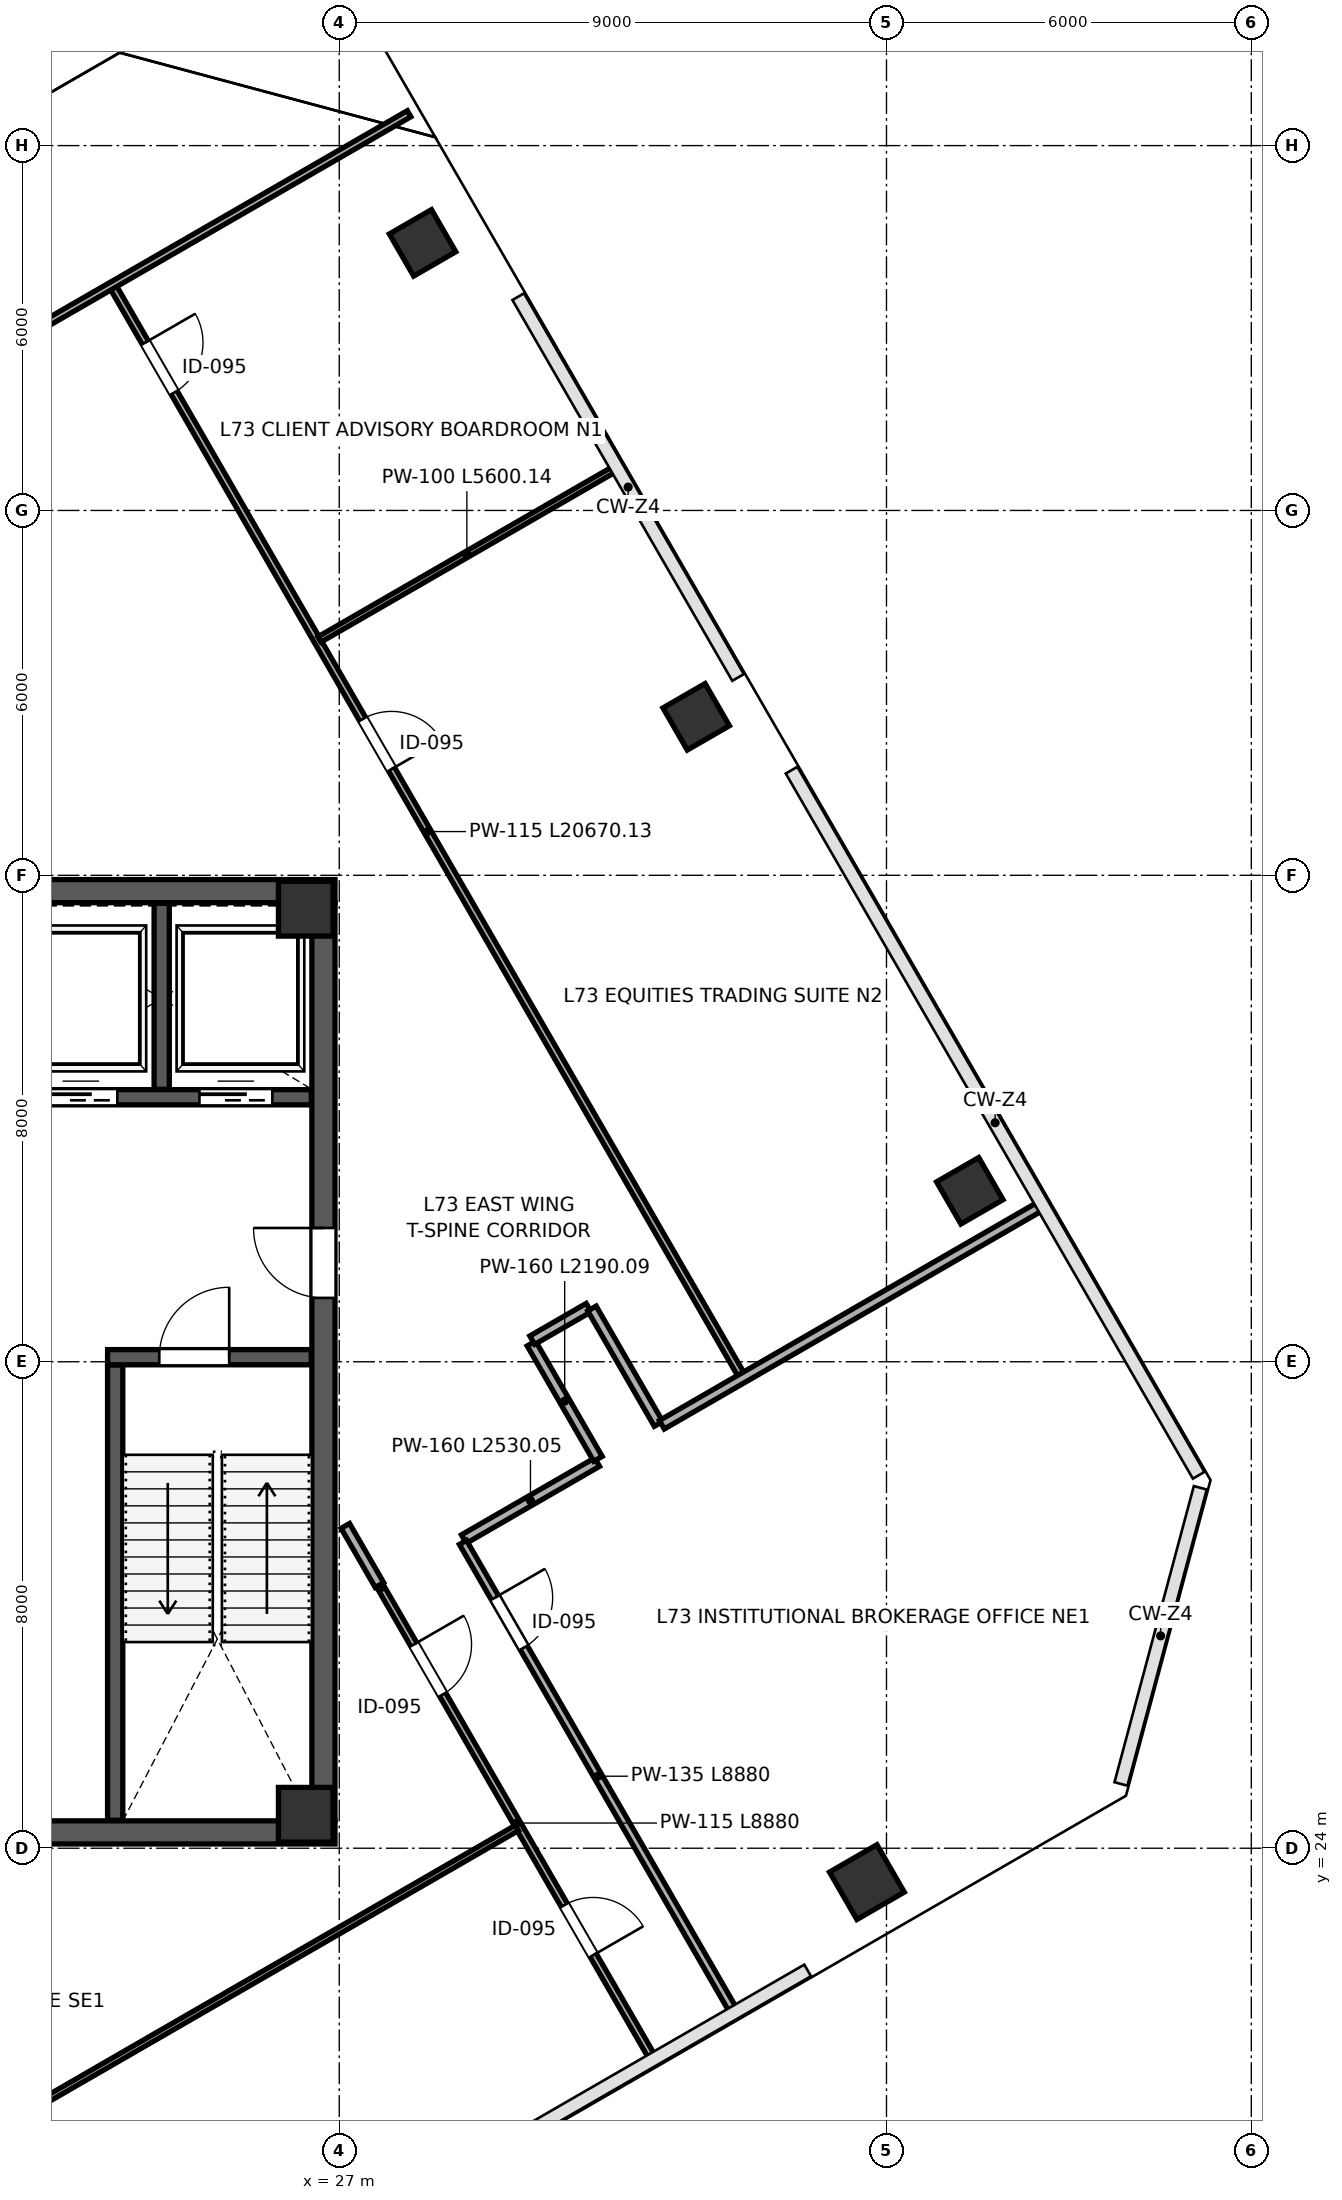
"""IFC4 building model, lengths in metres.
Left out: names, types, materials, properties, quantities, classifications, styles, units other than length and angle.
Written with IfcOpenShell. Run it as: python <this file> out.ifc"""

import sys

from ifc_helpers import new_model, si_unit, direction, frame, frame_2d, origin, origin_2d, place, context, subcontext, project, spatial, rectangle, extrude, clip, halfspace, source, transform, mapped, element, fill, save


model = new_model("IFC4")
c1 = context("Model", 3, precision=1e-05, world=origin(), true_north=direction((0.0, 1.0)))
c2 = subcontext(c1, "Body", "Model", "MODEL_VIEW")
j1 = project(units=[si_unit("LENGTHUNIT", "METRE"), si_unit("PLANEANGLEUNIT", "RADIAN")], contexts=[c1])
p1 = place(None, origin())
s1 = spatial("IfcSite", under=j1, at=p1, CompositionType="ELEMENT")
p2 = place(p1, origin())
s2 = spatial("IfcBuilding", under=s1, at=p2, CompositionType="ELEMENT")
p3 = place(p2, frame((0.0, 0.0, 324.0)))
s3 = spatial("IfcBuildingStorey", under=s2, at=p3, CompositionType="ELEMENT", Elevation=324.0)
m1 = source(origin(), c2, "Body", "SweptSolid", [
    extrude(rectangle(XDim=0.9, YDim=0.9, at=origin_2d()), origin(), (0.0, 0.0, 1.0), 4.198),
])
for number, where, z_axis, x_axis in (
    (1, (26.45, 24.55, 0.001), (0.0, 0.0, 1.0), (1.0, 0.0, 0.0)),
    (2, (26.45, 39.45, 0.001), (0.0, 0.0, 1.0), (1.0, 0.0, 0.0)),
):
    element("IfcColumn", number, at=place(p3, frame(where, z_axis=z_axis, x_axis=x_axis)), inside=s3, PredefinedType="COLUMN", context=c2, shape_type="MappedRepresentation", body=[
        mapped(m1, transform((0.0, 0.0, 0.0), scale=1.0)),
    ])
p4 = place(p3, frame((28.37, 50.4, 0.0), z_axis=(0.185732133875, -0.074042249015, 0.979806776771), x_axis=(-0.973368515453, -0.150232230162, 0.173158915868)))
e3 = element("IfcColumn", 3, at=p4, inside=s3, PredefinedType="COLUMN", context=c2, shape_type="Clipping", body=[
    clip(clip(extrude(rectangle(XDim=0.8, YDim=0.8, at=origin_2d()), origin(), (0.0, 0.0, 1.0), 4.287), halfspace(frame((0.0, 0.0, 0.112), z_axis=(0.0, 0.0, -1.0), x_axis=(1.0, 0.0, 0.0)), False)), halfspace(frame((0.0, 0.0, 4.174), z_axis=(0.0, 0.0, 1.0), x_axis=(1.0, 0.0, 0.0)), False)),
])
p5 = place(p3, frame((32.87, 42.606, 0.0), z_axis=(0.106163630579, -0.118960651995, 0.987206992894), x_axis=(-0.942303498906, 0.304954670505, 0.138082456835)))
e4 = element("IfcColumn", 4, at=p5, inside=s3, PredefinedType="COLUMN", context=c2, shape_type="Clipping", body=[
    clip(clip(extrude(rectangle(XDim=0.8, YDim=0.8, at=origin_2d()), origin(), (0.0, 0.0, 1.0), 4.254), halfspace(frame((0.0, 0.0, 0.089), z_axis=(0.0, 0.0, -1.0), x_axis=(1.0, 0.0, 0.0)), False)), halfspace(frame((0.0, 0.0, 4.165), z_axis=(0.0, 0.0, 1.0), x_axis=(1.0, 0.0, 0.0)), False)),
])
p6 = place(p3, frame((37.37, 34.812, 0.0), z_axis=(0.025225683196, -0.1632216365, 0.986266881876), x_axis=(-0.624589738199, 0.767743075938, 0.143032263094)))
e5 = element("IfcColumn", 5, at=p6, inside=s3, PredefinedType="COLUMN", context=c2, shape_type="Clipping", body=[
    clip(clip(extrude(rectangle(XDim=0.8, YDim=0.8, at=origin_2d()), origin(), (0.0, 0.0, 1.0), 4.259), halfspace(frame((0.0, 0.0, 0.092), z_axis=(0.0, 0.0, -1.0), x_axis=(1.0, 0.0, 0.0)), False)), halfspace(frame((0.0, 0.0, 4.166), z_axis=(0.0, 0.0, 1.0), x_axis=(1.0, 0.0, 0.0)), False)),
])
p7 = place(p3, frame((35.678, 23.443, 0.0), z_axis=(-0.090743878164, -0.143219504678, 0.985522055591), x_axis=(0.034438656764, 0.988561718084, 0.146832245976)))
e6 = element("IfcColumn", 6, at=p7, inside=s3, PredefinedType="COLUMN", context=c2, shape_type="Clipping", body=[
    clip(clip(extrude(rectangle(XDim=0.9, YDim=0.9, at=origin_2d()), origin(), (0.0, 0.0, 1.0), 4.262), halfspace(frame((0.0, 0.0, 0.106), z_axis=(0.0, 0.0, -1.0), x_axis=(1.0, 0.0, 0.0)), False)), halfspace(frame((0.0, 0.0, 4.155), z_axis=(0.0, 0.0, 1.0), x_axis=(1.0, 0.0, 0.0)), False)),
])
p8 = place(p3, frame((26.74, 24.45, 0.0), z_axis=(0.0, 0.0, 1.0), x_axis=(0.0, 1.0, 0.0)))
e7 = element("IfcWall", 7, at=p8, inside=s3, PredefinedType="SHEAR", context=c2, shape_type="SweptSolid", body=[
    extrude(rectangle(XDim=15.1, YDim=0.38, at=frame_2d((7.55, 0.0))), origin(), (0.0, 0.0, 1.0), 3.96),
])
p9 = place(p8, frame((8.6, 0.0, 0.0)))
e8 = element("IfcOpeningElement", 8, at=p9, cuts=e7, PredefinedType="OPENING", context=c2, shape_type="SweptSolid", body=[
    extrude(rectangle(XDim=1.15, YDim=2.2, at=frame_2d((0.575, 1.1))), frame((0.0, 0.2, 0.0), z_axis=(0.0, -1.0, 0.0), x_axis=(1.0, 0.0, 0.0)), (0.0, 0.0, 1.0), 0.4),
])
for number, where, z_axis, x_axis in (
    (9, (9.07, 24.26, 0.0), (0.0, 0.0, 1.0), (1.0, 0.0, 0.0)),
    (10, (9.07, 39.74, 0.0), (0.0, 0.0, 1.0), (1.0, 0.0, 0.0)),
):
    element("IfcWall", number, at=place(p3, frame(where, z_axis=z_axis, x_axis=x_axis)), inside=s3, PredefinedType="SHEAR", context=c2, shape_type="SweptSolid", body=[
        extrude(rectangle(XDim=17.86, YDim=0.38, at=frame_2d((8.93, 0.0))), origin(), (0.0, 0.0, 1.0), 3.96),
    ])
p10 = place(p3, frame((23.315, 24.46, 0.0), z_axis=(0.0, 0.0, 1.0), x_axis=(0.0, 1.0, 0.0)))
e11 = element("IfcWall", 11, at=p10, inside=s3, PredefinedType="SHEAR", context=c2, shape_type="SweptSolid", body=[
    extrude(rectangle(XDim=7.49, YDim=0.25, at=frame_2d((3.745, 0.0))), origin(), (0.0, 0.0, 1.0), 3.96),
])
p11 = place(p3, frame((23.19, 32.075, 0.0), z_axis=(0.0, 0.0, 1.0), x_axis=(1.0, 0.0, 0.0)))
e12 = element("IfcWall", 12, at=p11, inside=s3, PredefinedType="SHEAR", context=c2, shape_type="SweptSolid", body=[
    extrude(rectangle(XDim=3.35, YDim=0.25, at=frame_2d((1.675, 0.0))), origin(), (0.0, 0.0, 1.0), 3.96),
])
p12 = place(p11, frame((0.85, 0.0, 0.0)))
e13 = element("IfcOpeningElement", 13, at=p12, cuts=e12, PredefinedType="OPENING", context=c2, shape_type="SweptSolid", body=[
    extrude(rectangle(XDim=1.15, YDim=2.2, at=frame_2d((0.575, 1.1))), frame((0.0, 0.135, 0.0), z_axis=(0.0, -1.0, 0.0), x_axis=(1.0, 0.0, 0.0)), (0.0, 0.0, 1.0), 0.27),
])
p13 = place(p3, frame((21.45, 36.35, 0.0), z_axis=(0.0, 0.0, 1.0), x_axis=(1.0, 0.0, 0.0)))
e14 = element("IfcWall", 14, at=p13, inside=s3, PredefinedType="SHEAR", context=c2, shape_type="SweptSolid", body=[
    extrude(rectangle(XDim=5.09, YDim=0.25, at=frame_2d((2.545, 0.0))), origin(), (0.0, 0.0, 1.0), 3.96),
])
p14 = place(p13, frame((0.7, 0.0, 0.0)))
e15 = element("IfcOpeningElement", 15, at=p14, cuts=e14, PredefinedType="OPENING", context=c2, shape_type="SweptSolid", body=[
    extrude(rectangle(XDim=1.2, YDim=2.2, at=frame_2d((0.6, 1.1))), frame((0.0, 0.135, 0.0), z_axis=(0.0, -1.0, 0.0), x_axis=(1.0, 0.0, 0.0)), (0.0, 0.0, 1.0), 0.27),
])
p15 = place(p13, frame((3.25, 0.0, 0.0)))
e16 = element("IfcOpeningElement", 16, at=p15, cuts=e14, PredefinedType="OPENING", context=c2, shape_type="SweptSolid", body=[
    extrude(rectangle(XDim=1.2, YDim=2.2, at=frame_2d((0.6, 1.1))), frame((0.0, 0.135, 0.0), z_axis=(0.0, -1.0, 0.0), x_axis=(1.0, 0.0, 0.0)), (0.0, 0.0, 1.0), 0.27),
])
p16 = place(p3, frame((24.08, 36.48, 0.0), z_axis=(0.0, 0.0, 1.0), x_axis=(0.0, 1.0, 0.0)))
e17 = element("IfcWall", 17, at=p16, inside=s3, PredefinedType="SHEAR", context=c2, shape_type="SweptSolid", body=[
    extrude(rectangle(XDim=3.06, YDim=0.25, at=frame_2d((1.53, 0.0))), origin(), (0.0, 0.0, 1.0), 3.96),
])
p17 = place(p3, frame((27.1, 29.301, 0.0), z_axis=(0.0, 0.0, 1.0), x_axis=(0.499929606556, -0.866066041644, 0.0)))
e18 = element("IfcWall", 18, at=p17, inside=s3, PredefinedType="PARTITIONING", context=c2, shape_type="SweptSolid", body=[
    extrude(rectangle(XDim=1.122, YDim=0.16, at=frame_2d((0.561, 0.0))), origin(), (0.0, 0.0, 1.0), 3.96),
])
p18 = place(p3, frame((23.284, 49.669, 0.0), z_axis=(0.0, 0.0, 1.0), x_axis=(0.500004637929, -0.866022726058, 0.0)))
e19 = element("IfcWall", 19, at=p18, inside=s3, PredefinedType="PARTITIONING", context=c2, shape_type="SweptSolid", body=[
    extrude(rectangle(XDim=20.67, YDim=0.115, at=frame_2d((10.335, 0.0))), origin(), (0.0, 0.0, 1.0), 3.96),
])
p19 = place(p18, frame((1.05, 0.0, 0.0)))
e20 = element("IfcOpeningElement", 20, at=p19, cuts=e19, PredefinedType="OPENING", context=c2, shape_type="SweptSolid", body=[
    extrude(rectangle(XDim=0.95, YDim=2.15, at=frame_2d((0.475, 1.075))), frame((0.0, 0.067, 0.0), z_axis=(0.0, -1.0, 0.0), x_axis=(1.0, 0.0, 0.0)), (0.0, 0.0, 1.0), 0.135),
])
p20 = place(p18, frame((8.2, 0.0, 0.0)))
e21 = element("IfcOpeningElement", 21, at=p20, cuts=e19, PredefinedType="OPENING", context=c2, shape_type="SweptSolid", body=[
    extrude(rectangle(XDim=0.95, YDim=2.15, at=frame_2d((0.475, 1.075))), frame((0.0, 0.067, 0.0), z_axis=(0.0, -1.0, 0.0), x_axis=(1.0, 0.0, 0.0)), (0.0, 0.0, 1.0), 0.135),
])
p21 = place(p3, frame((26.674, 43.878, 0.0), z_axis=(0.0, 0.0, 1.0), x_axis=(0.866026594901, 0.49999793692, 0.0)))
e22 = element("IfcWall", 22, at=p21, inside=s3, PredefinedType="PARTITIONING", context=c2, shape_type="SweptSolid", body=[
    extrude(rectangle(XDim=5.6, YDim=0.1, at=frame_2d((2.8, 0.0))), origin(), (0.0, 0.0, 1.0), 3.295),
])
p22 = place(p3, frame((2.506, 37.719, 0.0), z_axis=(0.0, 0.0, 1.0), x_axis=(0.866023290802, 0.500003659775, 0.0)))
e23 = element("IfcWall", 23, at=p22, inside=s3, PredefinedType="PARTITIONING", context=c2, shape_type="SweptSolid", body=[
    extrude(rectangle(XDim=29.61, YDim=0.115, at=frame_2d((14.805, 0.0))), origin(), (0.0, 0.0, 1.0), 3.96),
])
p23 = place(p22, frame((2.1, 0.0, 0.0)))
e24 = element("IfcOpeningElement", 24, at=p23, cuts=e23, PredefinedType="OPENING", context=c2, shape_type="SweptSolid", body=[
    extrude(rectangle(XDim=0.95, YDim=2.15, at=frame_2d((0.475, 1.075))), frame((0.0, 0.067, 0.0), z_axis=(0.0, -1.0, 0.0), x_axis=(1.0, 0.0, 0.0)), (0.0, 0.0, 1.0), 0.135),
])
p24 = place(p22, frame((11.8, 0.0, 0.0)))
e25 = element("IfcOpeningElement", 25, at=p24, cuts=e23, PredefinedType="OPENING", context=c2, shape_type="SweptSolid", body=[
    extrude(rectangle(XDim=0.95, YDim=2.15, at=frame_2d((0.475, 1.075))), frame((0.0, 0.067, 0.0), z_axis=(0.0, -1.0, 0.0), x_axis=(1.0, 0.0, 0.0)), (0.0, 0.0, 1.0), 0.135),
])
p25 = place(p3, frame((29.049, 29.084, 0.0), z_axis=(0.0, 0.0, 1.0), x_axis=(0.866013648801, 0.500020359676, 0.0)))
e26 = element("IfcWall", 26, at=p25, inside=s3, PredefinedType="PARTITIONING", context=c2, shape_type="SweptSolid", body=[
    extrude(rectangle(XDim=2.53, YDim=0.16, at=frame_2d((1.265, 0.0))), origin(), (0.0, 0.0, 1.0), 3.96),
])
p26 = place(p3, frame((30.16, 32.3, 0.0), z_axis=(0.0, 0.0, 1.0), x_axis=(0.499963694393, -0.866046363822, 0.0)))
e27 = element("IfcWall", 27, at=p26, inside=s3, PredefinedType="PARTITIONING", context=c2, shape_type="SweptSolid", body=[
    extrude(rectangle(XDim=2.19, YDim=0.16, at=frame_2d((1.095, 0.0))), origin(), (0.0, 0.0, 1.0), 3.96),
])
p27 = place(p3, frame((30.175, 32.355, 0.0), z_axis=(0.0, 0.0, 1.0), x_axis=(0.866029778435, 0.499992422807, 0.0)))
e28 = element("IfcWall", 28, at=p27, inside=s3, PredefinedType="PARTITIONING", context=c2, shape_type="SweptSolid", body=[
    extrude(rectangle(XDim=1.07, YDim=0.16, at=frame_2d((0.535, 0.0))), origin(), (0.0, 0.0, 1.0), 3.96),
])
p28 = place(p3, frame((31.156, 32.875, 0.0), z_axis=(0.0, 0.0, 1.0), x_axis=(0.499963694393, -0.866046363822, 0.0)))
e29 = element("IfcWall", 29, at=p28, inside=s3, PredefinedType="PARTITIONING", context=c2, shape_type="SweptSolid", body=[
    extrude(rectangle(XDim=2.19, YDim=0.16, at=frame_2d((1.095, 0.0))), origin(), (0.0, 0.0, 1.0), 3.96),
])
p29 = place(p3, frame((32.306, 30.964, 0.0), z_axis=(0.0, 0.0, 1.0), x_axis=(0.866033266336, 0.499986381413, 0.0)))
e30 = element("IfcWall", 30, at=p29, inside=s3, PredefinedType="PARTITIONING", context=c2, shape_type="SweptSolid", body=[
    extrude(rectangle(XDim=7.18, YDim=0.16, at=frame_2d((3.59, 0.0))), origin(), (0.0, 0.0, 1.0), 3.295),
])
p30 = place(p3, frame((29.035, 29.029, 0.0), z_axis=(0.0, 0.0, 1.0), x_axis=(0.500000904628, -0.866024881496, 0.0)))
e31 = element("IfcWall", 31, at=p30, inside=s3, PredefinedType="PARTITIONING", context=c2, shape_type="SweptSolid", body=[
    extrude(rectangle(XDim=8.88, YDim=0.135, at=frame_2d((4.44, 0.0))), origin(), (0.0, 0.0, 1.0), 3.96),
])
p31 = place(p30, frame((1.05, 0.0, 0.0)))
e32 = element("IfcOpeningElement", 32, at=p31, cuts=e31, PredefinedType="OPENING", context=c2, shape_type="SweptSolid", body=[
    extrude(rectangle(XDim=0.95, YDim=2.15, at=frame_2d((0.475, 1.075))), frame((0.0, 0.078, 0.0), z_axis=(0.0, -1.0, 0.0), x_axis=(1.0, 0.0, 0.0)), (0.0, 0.0, 1.0), 0.155),
])
p32 = place(p3, frame((27.701, 28.26, 0.0), z_axis=(0.0, 0.0, 1.0), x_axis=(0.499988999718, -0.866031754707, 0.0)))
e33 = element("IfcWall", 33, at=p32, inside=s3, PredefinedType="PARTITIONING", context=c2, shape_type="SweptSolid", body=[
    extrude(rectangle(XDim=8.88, YDim=0.115, at=frame_2d((4.44, 0.0))), origin(), (0.0, 0.0, 1.0), 3.96),
])
p33 = place(p32, frame((1.05, 0.0, 0.0)))
e34 = element("IfcOpeningElement", 34, at=p33, cuts=e33, PredefinedType="OPENING", context=c2, shape_type="SweptSolid", body=[
    extrude(rectangle(XDim=0.95, YDim=2.15, at=frame_2d((0.475, 1.075))), frame((0.0, 0.067, 0.0), z_axis=(0.0, -1.0, 0.0), x_axis=(1.0, 0.0, 0.0)), (0.0, 0.0, 1.0), 0.135),
])
p34 = place(p32, frame((6.0, 0.0, 0.0)))
e35 = element("IfcOpeningElement", 35, at=p34, cuts=e33, PredefinedType="OPENING", context=c2, shape_type="SweptSolid", body=[
    extrude(rectangle(XDim=0.95, YDim=2.15, at=frame_2d((0.475, 1.075))), frame((0.0, 0.067, 0.0), z_axis=(0.0, -1.0, 0.0), x_axis=(1.0, 0.0, 0.0)), (0.0, 0.0, 1.0), 0.135),
])
p35 = place(p3, frame((13.917, 15.094, 0.0), z_axis=(0.0, 0.0, 1.0), x_axis=(0.86602564517, 0.499999581907, 0.0)))
e36 = element("IfcWall", 36, at=p35, inside=s3, PredefinedType="PARTITIONING", context=c2, shape_type="SweptSolid", body=[
    extrude(rectangle(XDim=18.48, YDim=0.1, at=frame_2d((9.24, 0.0))), origin(), (0.0, 0.0, 1.0), 3.96),
])
m2 = source(origin(), c2, "Body", "SweptSolid", [
    extrude(rectangle(XDim=1.15, YDim=2.2, at=frame_2d((0.575, 1.1))), frame((0.0, 0.025, 0.0), z_axis=(0.0, -1.0, 0.0), x_axis=(1.0, 0.0, 0.0)), (0.0, 0.0, 1.0), 0.05),
])
p36 = place(p12, origin())
e37 = element("IfcDoor", 37, at=p36, inside=s3, OperationType="SINGLE_SWING_RIGHT", PredefinedType="DOOR", context=c2, shape_type="MappedRepresentation", body=[
    mapped(m2, transform((0.0, 0.0, 0.0), scale=1.0)),
])
fill(e13, e37)
m3 = source(origin(), c2, "Body", "SweptSolid", [
    extrude(rectangle(XDim=1.15, YDim=2.2, at=frame_2d((0.575, 1.1))), frame((0.0, 0.025, 0.0), z_axis=(0.0, -1.0, 0.0), x_axis=(1.0, 0.0, 0.0)), (0.0, 0.0, 1.0), 0.05),
])
p37 = place(p9, origin())
e38 = element("IfcDoor", 38, at=p37, inside=s3, OperationType="SINGLE_SWING_RIGHT", PredefinedType="DOOR", context=c2, shape_type="MappedRepresentation", body=[
    mapped(m3, transform((0.0, 0.0, 0.0), scale=1.0)),
])
fill(e8, e38)
m4 = source(origin(), c2, "Body", "SweptSolid", [
    extrude(rectangle(XDim=1.2, YDim=2.2, at=frame_2d((0.6, 1.1))), frame((0.0, 0.025, 0.0), z_axis=(0.0, -1.0, 0.0), x_axis=(1.0, 0.0, 0.0)), (0.0, 0.0, 1.0), 0.05),
])
p38 = place(p14, origin())
e39 = element("IfcDoor", 39, at=p38, inside=s3, OperationType="SLIDING_TO_LEFT", PredefinedType="DOOR", context=c2, shape_type="MappedRepresentation", body=[
    mapped(m4, transform((0.0, 0.0, 0.0), scale=1.0)),
])
fill(e15, e39)
p39 = place(p15, origin())
e40 = element("IfcDoor", 40, at=p39, inside=s3, OperationType="SLIDING_TO_RIGHT", PredefinedType="DOOR", context=c2, shape_type="MappedRepresentation", body=[
    mapped(m4, transform((0.0, 0.0, 0.0), scale=1.0)),
])
fill(e16, e40)
m5 = source(origin(), c2, "Body", "SweptSolid", [
    extrude(rectangle(XDim=0.95, YDim=2.15, at=frame_2d((0.475, 1.075))), frame((0.0, 0.025, 0.0), z_axis=(0.0, -1.0, 0.0), x_axis=(1.0, 0.0, 0.0)), (0.0, 0.0, 1.0), 0.05),
])
p40 = place(p19, origin())
e41 = element("IfcDoor", 41, at=p40, inside=s3, OperationType="SINGLE_SWING_LEFT", PredefinedType="DOOR", context=c2, shape_type="MappedRepresentation", body=[
    mapped(m5, transform((0.0, 0.0, 0.0), scale=1.0)),
])
fill(e20, e41)
p41 = place(p20, origin())
e42 = element("IfcDoor", 42, at=p41, inside=s3, OperationType="SINGLE_SWING_RIGHT", PredefinedType="DOOR", context=c2, shape_type="MappedRepresentation", body=[
    mapped(m5, transform((0.0, 0.0, 0.0), scale=1.0)),
])
fill(e21, e42)
p42 = place(p31, origin())
e43 = element("IfcDoor", 43, at=p42, inside=s3, OperationType="SINGLE_SWING_LEFT", PredefinedType="DOOR", context=c2, shape_type="MappedRepresentation", body=[
    mapped(m5, transform((0.0, 0.0, 0.0), scale=1.0)),
])
fill(e32, e43)
p43 = place(p33, origin())
e44 = element("IfcDoor", 44, at=p43, inside=s3, OperationType="SINGLE_SWING_LEFT", PredefinedType="DOOR", context=c2, shape_type="MappedRepresentation", body=[
    mapped(m5, transform((0.0, 0.0, 0.0), scale=1.0)),
])
fill(e34, e44)
p44 = place(p34, origin())
e45 = element("IfcDoor", 45, at=p44, inside=s3, OperationType="SINGLE_SWING_RIGHT", PredefinedType="DOOR", context=c2, shape_type="MappedRepresentation", body=[
    mapped(m5, transform((0.0, 0.0, 0.0), scale=1.0)),
])
fill(e35, e45)
save(model, sys.argv[1])
